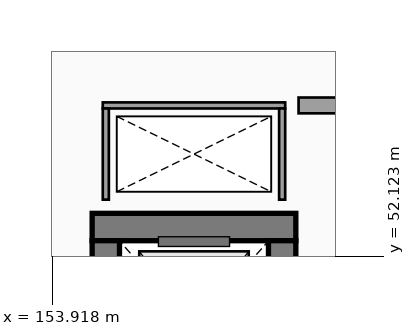
"""IFC4 building model, lengths in metres.
Left out: names, types, materials, properties, quantities, classifications, styles, units other than length and angle.
Written with IfcOpenShell. Run it as: python <this file> out.ifc"""

import sys

from ifc_helpers import new_model, si_unit, direction, frame, frame_2d, origin, place, context, subcontext, project, spatial, rectangle, extrude, element, save


model = new_model("IFC4")
c1 = context("Model", 3, precision=1e-05, world=origin(), true_north=direction((0.0, 1.0)))
c2 = subcontext(c1, "Body", "Model", "MODEL_VIEW")
j1 = project(units=[si_unit("LENGTHUNIT", "METRE"), si_unit("PLANEANGLEUNIT", "RADIAN")], contexts=[c1])
p1 = place(None, origin())
s1 = spatial("IfcSite", under=j1, at=p1, CompositionType="ELEMENT")
p2 = place(p1, origin())
s2 = spatial("IfcBuilding", under=s1, at=p2, CompositionType="ELEMENT")
p3 = place(p2, frame((0.0, 0.0, 23.1)))
s3 = spatial("IfcBuildingStorey", under=s2, at=p3, CompositionType="ELEMENT", Elevation=23.1)
p4 = place(p3, frame((157.925, 52.6, 0.0), z_axis=(0.0, 0.0, 1.0), x_axis=(-1.0, 0.0, 0.0)))
e1 = element("IfcWall", 1, at=p4, inside=s3, PredefinedType="SHEAR", context=c2, shape_type="SweptSolid", body=[
    extrude(rectangle(XDim=3.35, YDim=0.45, at=frame_2d((1.675, 0.0))), origin(), (0.0, 0.0, 1.0), 4.82),
])
p5 = place(p3, frame((154.8, 52.375, 0.0), z_axis=(0.0, 0.0, 1.0), x_axis=(0.0, -1.0, 0.0)))
e2 = element("IfcWall", 2, at=p5, inside=s3, PredefinedType="SHEAR", context=c2, shape_type="SweptSolid", body=[
    extrude(rectangle(XDim=2.75, YDim=0.45, at=frame_2d((1.375, 0.0))), origin(), (0.0, 0.0, 1.0), 4.82),
])
p6 = place(p3, frame((157.7, 49.625, 0.0), z_axis=(0.0, 0.0, 1.0), x_axis=(0.0, 1.0, 0.0)))
e3 = element("IfcWall", 3, at=p6, inside=s3, PredefinedType="SHEAR", context=c2, shape_type="SweptSolid", body=[
    extrude(rectangle(XDim=2.75, YDim=0.45, at=frame_2d((1.375, 0.0))), origin(), (0.0, 0.0, 1.0), 4.82),
])
p7 = place(p6, frame((0.725, 0.0, 0.0), z_axis=(0.0, 0.0, 1.0), x_axis=(1.0, 0.0, 0.0)))
e4 = element("IfcOpeningElement", 4, at=p7, cuts=e3, PredefinedType="OPENING", context=c2, shape_type="SweptSolid", body=[
    extrude(rectangle(XDim=1.3, YDim=2.25, at=frame_2d((0.65, 1.125))), frame((0.0, 0.235, 0.0), z_axis=(0.0, -1.0, 0.0), x_axis=(1.0, 0.0, 0.0)), (0.0, 0.0, 1.0), 0.47),
])
p8 = place(p3, frame((157.75, 54.6, 0.0), z_axis=(0.0, 0.0, 1.0), x_axis=(-1.0, 0.0, 0.0)))
e5 = element("IfcWall", 5, at=p8, inside=s3, PredefinedType="PARTITIONING", context=c2, shape_type="SweptSolid", body=[
    extrude(rectangle(XDim=3.0, YDim=0.1, at=frame_2d((1.5, 0.0))), origin(), (0.0, 0.0, 1.0), 4.82),
])
for number, where, z_axis, x_axis in (
    (6, (154.8, 54.55, 0.0), (0.0, 0.0, 1.0), (0.0, -1.0, 0.0)),
    (7, (157.7, 53.05, 0.0), (0.0, 0.0, 1.0), (0.0, 1.0, 0.0)),
):
    element("IfcWall", number, at=place(p3, frame(where, z_axis=z_axis, x_axis=x_axis)), inside=s3, PredefinedType="PARTITIONING", context=c2, shape_type="SweptSolid", body=[
        extrude(rectangle(XDim=1.5, YDim=0.1, at=frame_2d((0.75, 0.0))), origin(), (0.0, 0.0, 1.0), 4.82),
    ])
p9 = place(p3, frame((161.73, 54.6, 0.0), z_axis=(0.0, 0.0, 1.0), x_axis=(-1.0, 0.0, 0.0)))
e8 = element("IfcWall", 8, at=p9, inside=s3, PredefinedType="SOLIDWALL", context=c2, shape_type="SweptSolid", body=[
    extrude(rectangle(XDim=3.76, YDim=0.26, at=frame_2d((1.88, 0.0))), origin(), (0.0, 0.0, 1.0), 4.82),
])
p10 = place(p9, frame((2.805, 0.0, 0.0), z_axis=(0.0, 0.0, 1.0), x_axis=(-1.0, 0.0, 0.0)))
e9 = element("IfcOpeningElement", 9, at=p10, cuts=e8, PredefinedType="OPENING", context=c2, shape_type="SweptSolid", body=[
    extrude(rectangle(XDim=1.85, YDim=2.25, at=frame_2d((0.925, 1.125))), frame((0.0, 0.14, 0.0), z_axis=(0.0, -1.0, 0.0), x_axis=(1.0, 0.0, 0.0)), (0.0, 0.0, 1.0), 0.28),
])
save(model, sys.argv[1])
